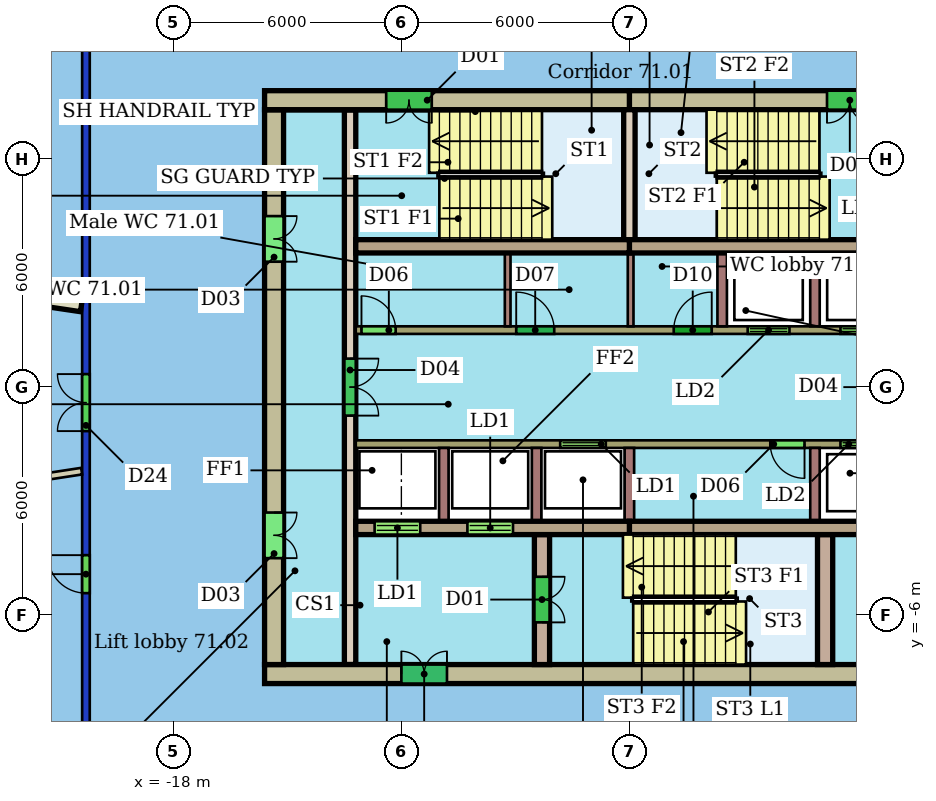
"""IFC4 building model, lengths in metres.
Left out: names, types, materials, properties, quantities, classifications, styles, units other than length and angle.
Written with IfcOpenShell. Run it as: python <this file> out.ifc"""

import sys

from ifc_helpers import new_model, si_unit, direction, frame, frame_2d, origin, place, context, subcontext, project, spatial, rectangle, extrude, element, fill, save


model = new_model("IFC4")
c1 = context("Model", 3, precision=1e-05, world=origin(), true_north=direction((0.0, 1.0)))
c2 = subcontext(c1, "Body", "Model", "MODEL_VIEW")
j1 = project(units=[si_unit("LENGTHUNIT", "METRE"), si_unit("PLANEANGLEUNIT", "RADIAN")], contexts=[c1])
p1 = place(None, origin())
s1 = spatial("IfcSite", under=j1, at=p1, CompositionType="ELEMENT")
p2 = place(p1, origin())
s2 = spatial("IfcBuilding", under=s1, at=p2, CompositionType="ELEMENT")
p3 = place(p2, frame((0.0, 0.0, 286.5)))
s3 = spatial("IfcBuildingStorey", under=s2, at=p3, CompositionType="ELEMENT", Elevation=286.5)
p4 = place(p3, frame((-20.3, -9.8, 0.0), z_axis=(0.0, 0.0, 1.0), x_axis=(0.0, 1.0, 0.0)))
e1 = element("IfcWall", 1, at=p4, inside=s3, PredefinedType="PARTITIONING", context=c2, shape_type="SweptSolid", body=[
    extrude(rectangle(XDim=19.6, YDim=0.2, at=frame_2d((9.8, 0.0))), origin(), (0.0, 0.0, 1.0), 3.1),
])
p5 = place(p4, frame((8.643, 0.0, 0.0)))
e2 = element("IfcOpeningElement", 2, at=p5, cuts=e1, PredefinedType="OPENING", context=c2, shape_type="SweptSolid", body=[
    extrude(rectangle(XDim=1.5, YDim=2.1, at=frame_2d((0.75, 1.05))), frame((0.0, 0.11, 0.0), z_axis=(0.0, -1.0, 0.0), x_axis=(1.0, 0.0, 0.0)), (0.0, 0.0, 1.0), 0.22),
])
p6 = place(p4, frame((4.379, 0.0, 0.0)))
e3 = element("IfcOpeningElement", 3, at=p6, cuts=e1, PredefinedType="OPENING", context=c2, shape_type="SweptSolid", body=[
    extrude(rectangle(XDim=1.0, YDim=2.1, at=frame_2d((0.5, 1.05))), frame((0.0, 0.11, 0.0), z_axis=(0.0, -1.0, 0.0), x_axis=(1.0, 0.0, 0.0)), (0.0, 0.0, 1.0), 0.22),
])
p7 = place(p3, frame((-26.358, 3.012, 0.0), z_axis=(0.0, 0.0, 1.0), x_axis=(0.989235111516, -0.146334869885, 0.0)))
e4 = element("IfcWall", 4, at=p7, inside=s3, PredefinedType="PARTITIONING", context=c2, shape_type="SweptSolid", body=[
    extrude(rectangle(XDim=6.001, YDim=0.3, at=frame_2d((3.0, 0.0))), origin(), (0.0, 0.0, 1.0), 3.45),
])
p8 = place(p3, frame((-27.228, -3.256, 0.0), z_axis=(0.0, 0.0, 1.0), x_axis=(0.988435478187, 0.151642030654, 0.0)))
e5 = element("IfcWall", 5, at=p8, inside=s3, PredefinedType="PARTITIONING", context=c2, shape_type="SweptSolid", body=[
    extrude(rectangle(XDim=6.894, YDim=0.175, at=frame_2d((3.447, 0.0))), origin(), (0.0, 0.0, 1.0), 3.45),
])
p9 = place(p3, frame((3.6, 7.55, 0.0), z_axis=(0.0, 0.0, 1.0), x_axis=(-1.0, 0.0, 0.0)))
e6 = element("IfcWall", 6, at=p9, inside=s3, PredefinedType="SHEAR", context=c2, shape_type="SweptSolid", body=[
    extrude(rectangle(XDim=9.6, YDim=0.5, at=frame_2d((4.8, 0.0))), origin(), (0.0, 0.0, 1.0), 3.3),
])
p10 = place(p9, frame((3.2, 0.0, 0.0)))
e7 = element("IfcOpeningElement", 7, at=p10, cuts=e6, PredefinedType="OPENING", context=c2, shape_type="SweptSolid", body=[
    extrude(rectangle(XDim=1.2, YDim=2.1, at=frame_2d((0.6, 1.05))), frame((0.0, 0.26, 0.0), z_axis=(0.0, -1.0, 0.0), x_axis=(1.0, 0.0, 0.0)), (0.0, 0.0, 1.0), 0.52),
])
p11 = place(p3, frame((-6.0, 7.55, 0.0), z_axis=(0.0, 0.0, 1.0), x_axis=(-1.0, 0.0, 0.0)))
e8 = element("IfcWall", 8, at=p11, inside=s3, PredefinedType="SHEAR", context=c2, shape_type="SweptSolid", body=[
    extrude(rectangle(XDim=9.6, YDim=0.5, at=frame_2d((4.8, 0.0))), origin(), (0.0, 0.0, 1.0), 3.3),
])
p12 = place(p11, frame((5.2, 0.0, 0.0)))
e9 = element("IfcOpeningElement", 9, at=p12, cuts=e8, PredefinedType="OPENING", context=c2, shape_type="SweptSolid", body=[
    extrude(rectangle(XDim=1.2, YDim=2.1, at=frame_2d((0.6, 1.05))), frame((0.0, 0.26, 0.0), z_axis=(0.0, -1.0, 0.0), x_axis=(1.0, 0.0, 0.0)), (0.0, 0.0, 1.0), 0.52),
])
p13 = place(p3, frame((-15.6, -7.55, 0.0), z_axis=(0.0, 0.0, 1.0), x_axis=(1.0, 0.0, 0.0)))
e10 = element("IfcWall", 10, at=p13, inside=s3, PredefinedType="SHEAR", context=c2, shape_type="SweptSolid", body=[
    extrude(rectangle(XDim=19.2, YDim=0.5, at=frame_2d((9.6, 0.0))), origin(), (0.0, 0.0, 1.0), 3.3),
])
p14 = place(p13, frame((3.6, 0.0, 0.0)))
e11 = element("IfcOpeningElement", 11, at=p14, cuts=e10, PredefinedType="OPENING", context=c2, shape_type="SweptSolid", body=[
    extrude(rectangle(XDim=1.2, YDim=2.1, at=frame_2d((0.6, 1.05))), frame((0.0, 0.26, 0.0), z_axis=(0.0, -1.0, 0.0), x_axis=(1.0, 0.0, 0.0)), (0.0, 0.0, 1.0), 0.52),
])
p15 = place(p3, frame((-15.35, 7.3, 0.0), z_axis=(0.0, 0.0, 1.0), x_axis=(0.0, -1.0, 0.0)))
e12 = element("IfcWall", 12, at=p15, inside=s3, PredefinedType="SHEAR", context=c2, shape_type="SweptSolid", body=[
    extrude(rectangle(XDim=14.6, YDim=0.5, at=frame_2d((7.3, 0.0))), origin(), (0.0, 0.0, 1.0), 3.3),
])
p16 = place(p15, frame((10.6, 0.0, 0.0)))
e13 = element("IfcOpeningElement", 13, at=p16, cuts=e12, PredefinedType="OPENING", context=c2, shape_type="SweptSolid", body=[
    extrude(rectangle(XDim=1.2, YDim=2.1, at=frame_2d((0.6, 1.05))), frame((0.0, 0.26, 0.0), z_axis=(0.0, -1.0, 0.0), x_axis=(1.0, 0.0, 0.0)), (0.0, 0.0, 1.0), 0.52),
])
p17 = place(p15, frame((2.8, 0.0, 0.0)))
e14 = element("IfcOpeningElement", 14, at=p17, cuts=e12, PredefinedType="OPENING", context=c2, shape_type="SweptSolid", body=[
    extrude(rectangle(XDim=1.2, YDim=2.1, at=frame_2d((0.6, 1.05))), frame((0.0, 0.26, 0.0), z_axis=(0.0, -1.0, 0.0), x_axis=(1.0, 0.0, 0.0)), (0.0, 0.0, 1.0), 0.52),
])
for number, where, z_axis, x_axis in (
    (15, (-13.2, 3.705, 0.0), (0.0, 0.0, 1.0), (1.0, 0.0, 0.0)),
    (16, (-6.0, 3.705, 0.0), (0.0, 0.0, 1.0), (1.0, 0.0, 0.0)),
):
    element("IfcWall", number, at=place(p3, frame(where, z_axis=z_axis, x_axis=x_axis)), inside=s3, PredefinedType="SHEAR", context=c2, shape_type="SweptSolid", body=[
        extrude(rectangle(XDim=7.2, YDim=0.35, at=frame_2d((3.6, 0.0))), origin(), (0.0, 0.0, 1.0), 3.3),
    ])
p18 = place(p3, frame((-13.2, -3.705, 0.0), z_axis=(0.0, 0.0, 1.0), x_axis=(1.0, 0.0, 0.0)))
e17 = element("IfcWall", 17, at=p18, inside=s3, PredefinedType="SHEAR", context=c2, shape_type="SweptSolid", body=[
    extrude(rectangle(XDim=7.2, YDim=0.35, at=frame_2d((3.6, 0.0))), origin(), (0.0, 0.0, 1.0), 3.3),
])
p19 = place(p18, frame((0.496, 0.0, 0.0)))
e18 = element("IfcOpeningElement", 18, at=p19, cuts=e17, PredefinedType="OPENING", context=c2, shape_type="SweptSolid", body=[
    extrude(rectangle(XDim=1.2, YDim=2.1, at=frame_2d((0.6, 1.05))), frame((0.0, 0.185, 0.0), z_axis=(0.0, -1.0, 0.0), x_axis=(1.0, 0.0, 0.0)), (0.0, 0.0, 1.0), 0.37),
])
p20 = place(p18, frame((2.938, 0.0, 0.0)))
e19 = element("IfcOpeningElement", 19, at=p20, cuts=e17, PredefinedType="OPENING", context=c2, shape_type="SweptSolid", body=[
    extrude(rectangle(XDim=1.2, YDim=2.1, at=frame_2d((0.6, 1.05))), frame((0.0, 0.185, 0.0), z_axis=(0.0, -1.0, 0.0), x_axis=(1.0, 0.0, 0.0)), (0.0, 0.0, 1.0), 0.37),
])
p21 = place(p3, frame((-6.0, -3.705, 0.0), z_axis=(0.0, 0.0, 1.0), x_axis=(1.0, 0.0, 0.0)))
e20 = element("IfcWall", 20, at=p21, inside=s3, PredefinedType="SHEAR", context=c2, shape_type="SweptSolid", body=[
    extrude(rectangle(XDim=7.2, YDim=0.35, at=frame_2d((3.6, 0.0))), origin(), (0.0, 0.0, 1.0), 3.3),
])
p22 = place(p3, frame((-13.35, 7.3, 0.0), z_axis=(0.0, 0.0, 1.0), x_axis=(0.0, -1.0, 0.0)))
e21 = element("IfcWall", 21, at=p22, inside=s3, PredefinedType="SHEAR", context=c2, shape_type="SweptSolid", body=[
    extrude(rectangle(XDim=14.6, YDim=0.3, at=frame_2d((7.3, 0.0))), origin(), (0.0, 0.0, 1.0), 3.3),
])
p23 = place(p22, frame((6.55, 0.0, 0.0)))
e22 = element("IfcOpeningElement", 22, at=p23, cuts=e21, PredefinedType="OPENING", context=c2, shape_type="SweptSolid", body=[
    extrude(rectangle(XDim=1.5, YDim=2.1, at=frame_2d((0.75, 1.05))), frame((0.0, 0.16, 0.0), z_axis=(0.0, -1.0, 0.0), x_axis=(1.0, 0.0, 0.0)), (0.0, 0.0, 1.0), 0.32),
])
p24 = place(p3, frame((-13.2, 1.5, 0.0), z_axis=(0.0, 0.0, 1.0), x_axis=(1.0, 0.0, 0.0)))
e23 = element("IfcWall", 23, at=p24, inside=s3, PredefinedType="SHEAR", context=c2, shape_type="SweptSolid", body=[
    extrude(rectangle(XDim=14.4, YDim=0.2, at=frame_2d((7.2, 0.0))), origin(), (0.0, 0.0, 1.0), 3.3),
])
p25 = place(p24, frame((10.312, 0.0, 0.0)))
e24 = element("IfcOpeningElement", 24, at=p25, cuts=e23, PredefinedType="OPENING", context=c2, shape_type="SweptSolid", body=[
    extrude(rectangle(XDim=1.1, YDim=2.1, at=frame_2d((0.55, 1.05))), frame((0.0, 0.11, 0.0), z_axis=(0.0, -1.0, 0.0), x_axis=(1.0, 0.0, 0.0)), (0.0, 0.0, 1.0), 0.22),
])
p26 = place(p24, frame((12.754, 0.0, 0.0)))
e25 = element("IfcOpeningElement", 25, at=p26, cuts=e23, PredefinedType="OPENING", context=c2, shape_type="SweptSolid", body=[
    extrude(rectangle(XDim=1.1, YDim=2.1, at=frame_2d((0.55, 1.05))), frame((0.0, 0.11, 0.0), z_axis=(0.0, -1.0, 0.0), x_axis=(1.0, 0.0, 0.0)), (0.0, 0.0, 1.0), 0.22),
])
p27 = place(p24, frame((0.15, 0.0, 0.0)))
e26 = element("IfcOpeningElement", 26, at=p27, cuts=e23, PredefinedType="OPENING", context=c2, shape_type="SweptSolid", body=[
    extrude(rectangle(XDim=0.9, YDim=2.1, at=frame_2d((0.45, 1.05))), frame((0.0, 0.11, 0.0), z_axis=(0.0, -1.0, 0.0), x_axis=(1.0, 0.0, 0.0)), (0.0, 0.0, 1.0), 0.22),
])
p28 = place(p24, frame((4.222, 0.0, 0.0)))
e27 = element("IfcOpeningElement", 27, at=p28, cuts=e23, PredefinedType="OPENING", context=c2, shape_type="SweptSolid", body=[
    extrude(rectangle(XDim=1.0, YDim=2.1, at=frame_2d((0.5, 1.05))), frame((0.0, 0.11, 0.0), z_axis=(0.0, -1.0, 0.0), x_axis=(1.0, 0.0, 0.0)), (0.0, 0.0, 1.0), 0.22),
])
p29 = place(p24, frame((8.367, 0.0, 0.0)))
e28 = element("IfcOpeningElement", 28, at=p29, cuts=e23, PredefinedType="OPENING", context=c2, shape_type="SweptSolid", body=[
    extrude(rectangle(XDim=1.0, YDim=2.1, at=frame_2d((0.5, 1.05))), frame((0.0, 0.11, 0.0), z_axis=(0.0, -1.0, 0.0), x_axis=(1.0, 0.0, 0.0)), (0.0, 0.0, 1.0), 0.22),
])
p30 = place(p3, frame((1.2, -1.5, 0.0), z_axis=(0.0, 0.0, 1.0), x_axis=(-1.0, 0.0, 0.0)))
e29 = element("IfcWall", 29, at=p30, inside=s3, PredefinedType="SHEAR", context=c2, shape_type="SweptSolid", body=[
    extrude(rectangle(XDim=14.4, YDim=0.2, at=frame_2d((7.2, 0.0))), origin(), (0.0, 0.0, 1.0), 3.3),
])
p31 = place(p30, frame((7.821, 0.0, 0.0)))
e30 = element("IfcOpeningElement", 30, at=p31, cuts=e29, PredefinedType="OPENING", context=c2, shape_type="SweptSolid", body=[
    extrude(rectangle(XDim=1.2, YDim=2.1, at=frame_2d((0.6, 1.05))), frame((0.0, 0.11, 0.0), z_axis=(0.0, -1.0, 0.0), x_axis=(1.0, 0.0, 0.0)), (0.0, 0.0, 1.0), 0.22),
])
p32 = place(p30, frame((0.546, 0.0, 0.0)))
e31 = element("IfcOpeningElement", 31, at=p32, cuts=e29, PredefinedType="OPENING", context=c2, shape_type="SweptSolid", body=[
    extrude(rectangle(XDim=1.1, YDim=2.1, at=frame_2d((0.55, 1.05))), frame((0.0, 0.11, 0.0), z_axis=(0.0, -1.0, 0.0), x_axis=(1.0, 0.0, 0.0)), (0.0, 0.0, 1.0), 0.22),
])
p33 = place(p30, frame((2.592, 0.0, 0.0)))
e32 = element("IfcOpeningElement", 32, at=p33, cuts=e29, PredefinedType="OPENING", context=c2, shape_type="SweptSolid", body=[
    extrude(rectangle(XDim=0.9, YDim=2.1, at=frame_2d((0.45, 1.05))), frame((0.0, 0.11, 0.0), z_axis=(0.0, -1.0, 0.0), x_axis=(1.0, 0.0, 0.0)), (0.0, 0.0, 1.0), 0.22),
])
p34 = place(p3, frame((-8.3, -3.88, 0.0), z_axis=(0.0, 0.0, 1.0), x_axis=(0.0, -1.0, 0.0)))
e33 = element("IfcWall", 33, at=p34, inside=s3, PredefinedType="SHEAR", context=c2, shape_type="SweptSolid", body=[
    extrude(rectangle(XDim=3.42, YDim=0.4, at=frame_2d((1.71, 0.0))), origin(), (0.0, 0.0, 1.0), 3.3),
])
p35 = place(p34, frame((1.11, 0.0, 0.0)))
e34 = element("IfcOpeningElement", 34, at=p35, cuts=e33, PredefinedType="OPENING", context=c2, shape_type="SweptSolid", body=[
    extrude(rectangle(XDim=1.2, YDim=2.1, at=frame_2d((0.6, 1.05))), frame((0.0, 0.21, 0.0), z_axis=(0.0, -1.0, 0.0), x_axis=(1.0, 0.0, 0.0)), (0.0, 0.0, 1.0), 0.42),
])
p36 = place(p3, frame((-0.85, -3.88, 0.0), z_axis=(0.0, 0.0, 1.0), x_axis=(0.0, -1.0, 0.0)))
e35 = element("IfcWall", 35, at=p36, inside=s3, PredefinedType="SHEAR", context=c2, shape_type="SweptSolid", body=[
    extrude(rectangle(XDim=3.42, YDim=0.4, at=frame_2d((1.71, 0.0))), origin(), (0.0, 0.0, 1.0), 3.3),
])
p37 = place(p3, frame((-6.0, 3.88, 0.0), z_axis=(0.0, 0.0, 1.0), x_axis=(0.0, 1.0, 0.0)))
e36 = element("IfcWall", 36, at=p37, inside=s3, PredefinedType="SHEAR", context=c2, shape_type="SweptSolid", body=[
    extrude(rectangle(XDim=3.42, YDim=0.3, at=frame_2d((1.71, 0.0))), origin(), (0.0, 0.0, 1.0), 3.3),
])
for number, where, z_axis, x_axis in (
    (37, (-3.558, 1.6, 0.0), (0.0, 0.0, 1.0), (0.0, 1.0, 0.0)),
    (38, (-1.117, 1.6, 0.0), (0.0, 0.0, 1.0), (0.0, 1.0, 0.0)),
):
    element("IfcWall", number, at=place(p3, frame(where, z_axis=z_axis, x_axis=x_axis)), inside=s3, PredefinedType="SHEAR", context=c2, shape_type="SweptSolid", body=[
        extrude(rectangle(XDim=1.93, YDim=0.25, at=frame_2d((0.965, 0.0))), origin(), (0.0, 0.0, 1.0), 3.3),
    ])
for number, where, z_axis, x_axis in (
    (39, (-9.203, 1.6, 0.0), (0.0, 0.0, 1.0), (0.0, 1.0, 0.0)),
    (40, (-5.967, 1.6, 0.0), (0.0, 0.0, 1.0), (0.0, 1.0, 0.0)),
):
    element("IfcWall", number, at=place(p3, frame(where, z_axis=z_axis, x_axis=x_axis)), inside=s3, PredefinedType="PARTITIONING", context=c2, shape_type="SweptSolid", body=[
        extrude(rectangle(XDim=1.93, YDim=0.15, at=frame_2d((0.965, 0.0))), origin(), (0.0, 0.0, 1.0), 3.3),
    ])
for number, where, z_axis, x_axis in (
    (41, (-10.883, -1.6, 0.0), (0.0, 0.0, 1.0), (0.0, -1.0, 0.0)),
    (42, (-8.442, -1.6, 0.0), (0.0, 0.0, 1.0), (0.0, -1.0, 0.0)),
    (43, (-6.0, -1.6, 0.0), (0.0, 0.0, 1.0), (0.0, -1.0, 0.0)),
    (44, (-1.117, -1.6, 0.0), (0.0, 0.0, 1.0), (0.0, -1.0, 0.0)),
):
    element("IfcWall", number, at=place(p3, frame(where, z_axis=z_axis, x_axis=x_axis)), inside=s3, PredefinedType="SHEAR", context=c2, shape_type="SweptSolid", body=[
        extrude(rectangle(XDim=1.93, YDim=0.25, at=frame_2d((0.965, 0.0))), origin(), (0.0, 0.0, 1.0), 3.3),
    ])
p38 = place(p5, origin())
e45 = element("IfcDoor", 45, at=p38, inside=s3, OperationType="DOUBLE_DOOR_SINGLE_SWING", PredefinedType="DOOR", context=c2, shape_type="SweptSolid", body=[
    extrude(rectangle(XDim=1.5, YDim=2.1, at=frame_2d((0.75, 1.05))), frame((0.0, 0.025, 0.0), z_axis=(0.0, -1.0, 0.0), x_axis=(1.0, 0.0, 0.0)), (0.0, 0.0, 1.0), 0.05),
])
fill(e2, e45)
p39 = place(p6, origin())
e46 = element("IfcDoor", 46, at=p39, inside=s3, OperationType="SINGLE_SWING_RIGHT", PredefinedType="DOOR", context=c2, shape_type="SweptSolid", body=[
    extrude(rectangle(XDim=1.0, YDim=2.1, at=frame_2d((0.5, 1.05))), frame((0.0, 0.025, 0.0), z_axis=(0.0, -1.0, 0.0), x_axis=(1.0, 0.0, 0.0)), (0.0, 0.0, 1.0), 0.05),
])
fill(e3, e46)
p40 = place(p10, origin())
e47 = element("IfcDoor", 47, at=p40, inside=s3, OperationType="DOUBLE_DOOR_SINGLE_SWING", PredefinedType="NOTDEFINED", context=c2, shape_type="SweptSolid", body=[
    extrude(rectangle(XDim=1.2, YDim=2.1, at=frame_2d((0.6, 1.05))), frame((0.0, 0.025, 0.0), z_axis=(0.0, -1.0, 0.0), x_axis=(1.0, 0.0, 0.0)), (0.0, 0.0, 1.0), 0.05),
])
fill(e7, e47)
p41 = place(p12, origin())
e48 = element("IfcDoor", 48, at=p41, inside=s3, OperationType="DOUBLE_DOOR_SINGLE_SWING", PredefinedType="NOTDEFINED", context=c2, shape_type="SweptSolid", body=[
    extrude(rectangle(XDim=1.2, YDim=2.1, at=frame_2d((0.6, 1.05))), frame((0.0, 0.025, 0.0), z_axis=(0.0, -1.0, 0.0), x_axis=(1.0, 0.0, 0.0)), (0.0, 0.0, 1.0), 0.05),
])
fill(e9, e48)
p42 = place(p14, origin())
e49 = element("IfcDoor", 49, at=p42, inside=s3, OperationType="DOUBLE_DOOR_SINGLE_SWING", PredefinedType="NOTDEFINED", context=c2, shape_type="SweptSolid", body=[
    extrude(rectangle(XDim=1.2, YDim=2.1, at=frame_2d((0.6, 1.05))), frame((0.0, 0.025, 0.0), z_axis=(0.0, -1.0, 0.0), x_axis=(1.0, 0.0, 0.0)), (0.0, 0.0, 1.0), 0.05),
])
fill(e11, e49)
p43 = place(p16, origin())
e50 = element("IfcDoor", 50, at=p43, inside=s3, OperationType="DOUBLE_DOOR_SINGLE_SWING", PredefinedType="NOTDEFINED", context=c2, shape_type="SweptSolid", body=[
    extrude(rectangle(XDim=1.2, YDim=2.1, at=frame_2d((0.6, 1.05))), frame((0.0, 0.025, 0.0), z_axis=(0.0, -1.0, 0.0), x_axis=(1.0, 0.0, 0.0)), (0.0, 0.0, 1.0), 0.05),
])
fill(e13, e50)
p44 = place(p17, origin())
e51 = element("IfcDoor", 51, at=p44, inside=s3, OperationType="DOUBLE_DOOR_SINGLE_SWING", PredefinedType="NOTDEFINED", context=c2, shape_type="SweptSolid", body=[
    extrude(rectangle(XDim=1.2, YDim=2.1, at=frame_2d((0.6, 1.05))), frame((0.0, 0.025, 0.0), z_axis=(0.0, -1.0, 0.0), x_axis=(1.0, 0.0, 0.0)), (0.0, 0.0, 1.0), 0.05),
])
fill(e14, e51)
p45 = place(p19, origin())
e52 = element("IfcDoor", 52, at=p45, inside=s3, OperationType="DOUBLE_DOOR_SLIDING", PredefinedType="NOTDEFINED", context=c2, shape_type="SweptSolid", body=[
    extrude(rectangle(XDim=1.2, YDim=2.1, at=frame_2d((0.6, 1.05))), frame((0.0, 0.025, 0.0), z_axis=(0.0, -1.0, 0.0), x_axis=(1.0, 0.0, 0.0)), (0.0, 0.0, 1.0), 0.05),
])
fill(e18, e52)
p46 = place(p20, origin())
e53 = element("IfcDoor", 53, at=p46, inside=s3, OperationType="DOUBLE_DOOR_SLIDING", PredefinedType="NOTDEFINED", context=c2, shape_type="SweptSolid", body=[
    extrude(rectangle(XDim=1.2, YDim=2.1, at=frame_2d((0.6, 1.05))), frame((0.0, 0.025, 0.0), z_axis=(0.0, -1.0, 0.0), x_axis=(1.0, 0.0, 0.0)), (0.0, 0.0, 1.0), 0.05),
])
fill(e19, e53)
p47 = place(p23, origin())
e54 = element("IfcDoor", 54, at=p47, inside=s3, OperationType="DOUBLE_DOOR_SINGLE_SWING", PredefinedType="NOTDEFINED", context=c2, shape_type="SweptSolid", body=[
    extrude(rectangle(XDim=1.5, YDim=2.1, at=frame_2d((0.75, 1.05))), frame((0.0, 0.025, 0.0), z_axis=(0.0, -1.0, 0.0), x_axis=(1.0, 0.0, 0.0)), (0.0, 0.0, 1.0), 0.05),
])
fill(e22, e54)
p48 = place(p25, origin())
e55 = element("IfcDoor", 55, at=p48, inside=s3, OperationType="DOUBLE_DOOR_SLIDING", PredefinedType="NOTDEFINED", context=c2, shape_type="SweptSolid", body=[
    extrude(rectangle(XDim=1.1, YDim=2.1, at=frame_2d((0.55, 1.05))), frame((0.0, 0.025, 0.0), z_axis=(0.0, -1.0, 0.0), x_axis=(1.0, 0.0, 0.0)), (0.0, 0.0, 1.0), 0.05),
])
fill(e24, e55)
p49 = place(p26, origin())
e56 = element("IfcDoor", 56, at=p49, inside=s3, OperationType="DOUBLE_DOOR_SLIDING", PredefinedType="NOTDEFINED", context=c2, shape_type="SweptSolid", body=[
    extrude(rectangle(XDim=1.1, YDim=2.1, at=frame_2d((0.55, 1.05))), frame((0.0, 0.025, 0.0), z_axis=(0.0, -1.0, 0.0), x_axis=(1.0, 0.0, 0.0)), (0.0, 0.0, 1.0), 0.05),
])
fill(e25, e56)
p50 = place(p27, origin())
e57 = element("IfcDoor", 57, at=p50, inside=s3, OperationType="SINGLE_SWING_LEFT", PredefinedType="NOTDEFINED", context=c2, shape_type="SweptSolid", body=[
    extrude(rectangle(XDim=0.9, YDim=2.1, at=frame_2d((0.45, 1.05))), frame((0.0, 0.025, 0.0), z_axis=(0.0, -1.0, 0.0), x_axis=(1.0, 0.0, 0.0)), (0.0, 0.0, 1.0), 0.05),
])
fill(e26, e57)
p51 = place(p28, origin())
e58 = element("IfcDoor", 58, at=p51, inside=s3, OperationType="SINGLE_SWING_LEFT", PredefinedType="NOTDEFINED", context=c2, shape_type="SweptSolid", body=[
    extrude(rectangle(XDim=1.0, YDim=2.1, at=frame_2d((0.5, 1.05))), frame((0.0, 0.025, 0.0), z_axis=(0.0, -1.0, 0.0), x_axis=(1.0, 0.0, 0.0)), (0.0, 0.0, 1.0), 0.05),
])
fill(e27, e58)
p52 = place(p29, origin())
e59 = element("IfcDoor", 59, at=p52, inside=s3, OperationType="SINGLE_SWING_RIGHT", PredefinedType="NOTDEFINED", context=c2, shape_type="SweptSolid", body=[
    extrude(rectangle(XDim=1.0, YDim=2.1, at=frame_2d((0.5, 1.05))), frame((0.0, 0.025, 0.0), z_axis=(0.0, -1.0, 0.0), x_axis=(1.0, 0.0, 0.0)), (0.0, 0.0, 1.0), 0.05),
])
fill(e28, e59)
p53 = place(p31, origin())
e60 = element("IfcDoor", 60, at=p53, inside=s3, OperationType="DOUBLE_DOOR_SLIDING", PredefinedType="NOTDEFINED", context=c2, shape_type="SweptSolid", body=[
    extrude(rectangle(XDim=1.2, YDim=2.1, at=frame_2d((0.6, 1.05))), frame((0.0, 0.025, 0.0), z_axis=(0.0, -1.0, 0.0), x_axis=(1.0, 0.0, 0.0)), (0.0, 0.0, 1.0), 0.05),
])
fill(e30, e60)
p54 = place(p32, origin())
e61 = element("IfcDoor", 61, at=p54, inside=s3, OperationType="DOUBLE_DOOR_SLIDING", PredefinedType="NOTDEFINED", context=c2, shape_type="SweptSolid", body=[
    extrude(rectangle(XDim=1.1, YDim=2.1, at=frame_2d((0.55, 1.05))), frame((0.0, 0.025, 0.0), z_axis=(0.0, -1.0, 0.0), x_axis=(1.0, 0.0, 0.0)), (0.0, 0.0, 1.0), 0.05),
])
fill(e31, e61)
p55 = place(p33, origin())
e62 = element("IfcDoor", 62, at=p55, inside=s3, OperationType="SINGLE_SWING_LEFT", PredefinedType="NOTDEFINED", context=c2, shape_type="SweptSolid", body=[
    extrude(rectangle(XDim=0.9, YDim=2.1, at=frame_2d((0.45, 1.05))), frame((0.0, 0.025, 0.0), z_axis=(0.0, -1.0, 0.0), x_axis=(1.0, 0.0, 0.0)), (0.0, 0.0, 1.0), 0.05),
])
fill(e32, e62)
p56 = place(p35, origin())
e63 = element("IfcDoor", 63, at=p56, inside=s3, OperationType="DOUBLE_DOOR_SINGLE_SWING", PredefinedType="NOTDEFINED", context=c2, shape_type="SweptSolid", body=[
    extrude(rectangle(XDim=1.2, YDim=2.1, at=frame_2d((0.6, 1.05))), frame((0.0, 0.025, 0.0), z_axis=(0.0, -1.0, 0.0), x_axis=(1.0, 0.0, 0.0)), (0.0, 0.0, 1.0), 0.05),
])
fill(e34, e63)
save(model, sys.argv[1])
